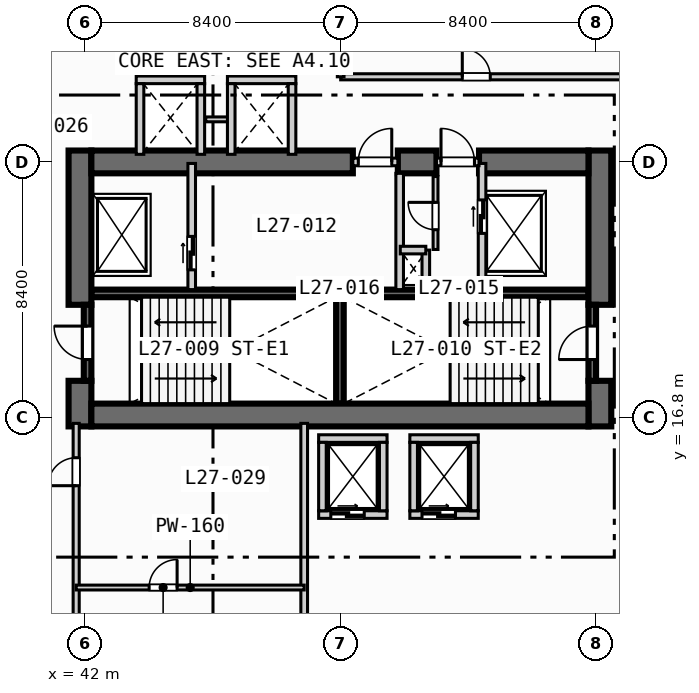
"""IFC4 building model, lengths in metres.
Left out: names, types, materials, properties, quantities, classifications, styles, units other than length and angle.
Written with IfcOpenShell. Run it as: python <this file> out.ifc"""

import sys

from ifc_helpers import new_model, si_unit, direction, frame, frame_2d, origin, place, context, subcontext, project, spatial, rectangle, extrude, element, fill, save


model = new_model("IFC4")
c1 = context("Model", 3, precision=1e-05, world=origin(), true_north=direction((0.0, 1.0)))
c2 = subcontext(c1, "Body", "Model", "MODEL_VIEW")
j1 = project(units=[si_unit("LENGTHUNIT", "METRE"), si_unit("PLANEANGLEUNIT", "RADIAN")], contexts=[c1])
p1 = place(None, origin())
s1 = spatial("IfcSite", under=j1, at=p1, CompositionType="ELEMENT")
p2 = place(p1, origin())
s2 = spatial("IfcBuilding", under=s1, at=p2, CompositionType="ELEMENT")
p3 = place(p2, frame((0.0, 0.0, 115.2)))
s3 = spatial("IfcBuildingStorey", under=s2, at=p3, CompositionType="ELEMENT", Elevation=115.2)
for number, where, z_axis, x_axis in (
    (1, (42.2, 20.875, 0.0), (0.0, 0.0, 1.0), (1.0, 0.0, 0.0)),
    (2, (50.5, 20.875, 0.0), (0.0, 0.0, 1.0), (1.0, 0.0, 0.0)),
):
    element("IfcWall", number, at=place(p3, frame(where, z_axis=z_axis, x_axis=x_axis)), inside=s3, PredefinedType="SOLIDWALL", context=c2, shape_type="SweptSolid", body=[
        extrude(rectangle(XDim=8.05, YDim=0.25, at=frame_2d((4.025, 0.0))), origin(), (0.0, 0.0, 1.0), 3.55),
    ])
p4 = place(p3, frame((50.375, 17.25, 0.0), z_axis=(0.0, 0.0, 1.0), x_axis=(0.0, 1.0, 0.0)))
e3 = element("IfcWall", 3, at=p4, inside=s3, PredefinedType="SOLIDWALL", context=c2, shape_type="SweptSolid", body=[
    extrude(rectangle(XDim=3.5, YDim=0.25, at=frame_2d((1.75, 0.0))), origin(), (0.0, 0.0, 1.0), 3.55),
])
p5 = place(p3, frame((41.825, 16.5, 0.0), z_axis=(0.0, 0.0, 1.0), x_axis=(0.0, 1.0, 0.0)))
e4 = element("IfcWall", 4, at=p5, inside=s3, PredefinedType="SHEAR", context=c2, shape_type="SweptSolid", body=[
    extrude(rectangle(XDim=1.5, YDim=0.75, at=frame_2d((0.75, 0.0))), origin(), (0.0, 0.0, 1.0), 3.55),
])
p6 = place(p3, frame((41.825, 20.5, 0.0), z_axis=(0.0, 0.0, 1.0), x_axis=(0.0, 1.0, 0.0)))
e5 = element("IfcWall", 5, at=p6, inside=s3, PredefinedType="SHEAR", context=c2, shape_type="SweptSolid", body=[
    extrude(rectangle(XDim=5.075, YDim=0.75, at=frame_2d((2.538, 0.0))), origin(), (0.0, 0.0, 1.0), 3.55),
])
p7 = place(p3, frame((58.925, 16.5, 0.0), z_axis=(0.0, 0.0, 1.0), x_axis=(0.0, 1.0, 0.0)))
e6 = element("IfcWall", 6, at=p7, inside=s3, PredefinedType="SHEAR", context=c2, shape_type="SweptSolid", body=[
    extrude(rectangle(XDim=1.5, YDim=0.75, at=frame_2d((0.75, 0.0))), origin(), (0.0, 0.0, 1.0), 3.55),
])
p8 = place(p3, frame((58.925, 20.5, 0.0), z_axis=(0.0, 0.0, 1.0), x_axis=(0.0, 1.0, 0.0)))
e7 = element("IfcWall", 7, at=p8, inside=s3, PredefinedType="SHEAR", context=c2, shape_type="SweptSolid", body=[
    extrude(rectangle(XDim=5.075, YDim=0.75, at=frame_2d((2.538, 0.0))), origin(), (0.0, 0.0, 1.0), 3.55),
])
p9 = place(p3, frame((42.2, 16.875, 0.0), z_axis=(0.0, 0.0, 1.0), x_axis=(1.0, 0.0, 0.0)))
e8 = element("IfcWall", 8, at=p9, inside=s3, PredefinedType="SHEAR", context=c2, shape_type="SweptSolid", body=[
    extrude(rectangle(XDim=16.35, YDim=0.75, at=frame_2d((8.175, 0.0))), origin(), (0.0, 0.0, 1.0), 3.55),
])
p10 = place(p3, frame((42.2, 25.2, 0.0), z_axis=(0.0, 0.0, 1.0), x_axis=(1.0, 0.0, 0.0)))
e9 = element("IfcWall", 9, at=p10, inside=s3, PredefinedType="SHEAR", context=c2, shape_type="SweptSolid", body=[
    extrude(rectangle(XDim=8.6, YDim=0.75, at=frame_2d((4.3, 0.0))), origin(), (0.0, 0.0, 1.0), 3.55),
])
p11 = place(p3, frame((52.28, 25.2, 0.0), z_axis=(0.0, 0.0, 1.0), x_axis=(1.0, 0.0, 0.0)))
e10 = element("IfcWall", 10, at=p11, inside=s3, PredefinedType="SHEAR", context=c2, shape_type="SweptSolid", body=[
    extrude(rectangle(XDim=1.27, YDim=0.75, at=frame_2d((0.635, 0.0))), origin(), (0.0, 0.0, 1.0), 3.55),
])
p12 = place(p3, frame((54.95, 25.2, 0.0), z_axis=(0.0, 0.0, 1.0), x_axis=(1.0, 0.0, 0.0)))
e11 = element("IfcWall", 11, at=p12, inside=s3, PredefinedType="SHEAR", context=c2, shape_type="SweptSolid", body=[
    extrude(rectangle(XDim=3.6, YDim=0.75, at=frame_2d((1.8, 0.0))), origin(), (0.0, 0.0, 1.0), 3.55),
])
p13 = place(p3, frame((42.075, 18.0, 0.0), z_axis=(0.0, 0.0, 1.0), x_axis=(0.0, 1.0, 0.0)))
e12 = element("IfcWall", 12, at=p13, inside=s3, PredefinedType="SOLIDWALL", context=c2, shape_type="SweptSolid", body=[
    extrude(rectangle(XDim=2.5, YDim=0.25, at=frame_2d((1.25, 0.0))), origin(), (0.0, 0.0, 1.0), 3.55),
])
p14 = place(p13, frame((0.7, 0.0, 0.0)))
e13 = element("IfcOpeningElement", 13, at=p14, cuts=e12, PredefinedType="OPENING", context=c2, shape_type="SweptSolid", body=[
    extrude(rectangle(XDim=1.1, YDim=2.15, at=frame_2d((0.55, 1.075))), frame((0.0, 0.135, 0.0), z_axis=(0.0, -1.0, 0.0), x_axis=(1.0, 0.0, 0.0)), (0.0, 0.0, 1.0), 0.27),
])
p15 = place(p3, frame((58.675, 18.0, 0.0), z_axis=(0.0, 0.0, 1.0), x_axis=(0.0, 1.0, 0.0)))
e14 = element("IfcWall", 14, at=p15, inside=s3, PredefinedType="SOLIDWALL", context=c2, shape_type="SweptSolid", body=[
    extrude(rectangle(XDim=2.5, YDim=0.25, at=frame_2d((1.25, 0.0))), origin(), (0.0, 0.0, 1.0), 3.55),
])
p16 = place(p15, frame((0.7, 0.0, 0.0)))
e15 = element("IfcOpeningElement", 15, at=p16, cuts=e14, PredefinedType="OPENING", context=c2, shape_type="SweptSolid", body=[
    extrude(rectangle(XDim=1.1, YDim=2.15, at=frame_2d((0.55, 1.075))), frame((0.0, 0.135, 0.0), z_axis=(0.0, -1.0, 0.0), x_axis=(1.0, 0.0, 0.0)), (0.0, 0.0, 1.0), 0.27),
])
p17 = place(p3, frame((45.5, 21.0, 0.0), z_axis=(0.0, 0.0, 1.0), x_axis=(0.0, 1.0, 0.0)))
e16 = element("IfcWall", 16, at=p17, inside=s3, PredefinedType="SOLIDWALL", context=c2, shape_type="SweptSolid", body=[
    extrude(rectangle(XDim=4.15, YDim=0.25, at=frame_2d((2.075, 0.0))), origin(), (0.0, 0.0, 1.0), 3.55),
])
p18 = place(p17, frame((0.65, 0.0, 0.0)))
e17 = element("IfcOpeningElement", 17, at=p18, cuts=e16, PredefinedType="OPENING", context=c2, shape_type="SweptSolid", body=[
    extrude(rectangle(XDim=1.1, YDim=2.15, at=frame_2d((0.55, 1.075))), frame((0.0, 0.135, 0.0), z_axis=(0.0, -1.0, 0.0), x_axis=(1.0, 0.0, 0.0)), (0.0, 0.0, 1.0), 0.27),
])
p19 = place(p3, frame((50.8, 25.2, 0.0), z_axis=(0.0, 0.0, 1.0), x_axis=(1.0, 0.0, 0.0)))
e18 = element("IfcWall", 18, at=p19, inside=s3, PredefinedType="SOLIDWALL", context=c2, shape_type="SweptSolid", body=[
    extrude(rectangle(XDim=1.48, YDim=0.25, at=frame_2d((0.74, 0.0))), origin(), (0.0, 0.0, 1.0), 3.55),
])
p20 = place(p19, frame((0.18, 0.0, 0.0)))
e19 = element("IfcOpeningElement", 19, at=p20, cuts=e18, PredefinedType="OPENING", context=c2, shape_type="SweptSolid", body=[
    extrude(rectangle(XDim=1.1, YDim=2.15, at=frame_2d((0.55, 1.075))), frame((0.0, 0.135, 0.0), z_axis=(0.0, -1.0, 0.0), x_axis=(1.0, 0.0, 0.0)), (0.0, 0.0, 1.0), 0.27),
])
p21 = place(p3, frame((52.34, 21.0, 0.0), z_axis=(0.0, 0.0, 1.0), x_axis=(0.0, 1.0, 0.0)))
e20 = element("IfcWall", 20, at=p21, inside=s3, PredefinedType="SOLIDWALL", context=c2, shape_type="SweptSolid", body=[
    extrude(rectangle(XDim=3.825, YDim=0.25, at=frame_2d((1.913, 0.0))), origin(), (0.0, 0.0, 1.0), 3.55),
])
p22 = place(p3, frame((55.05, 21.0, 0.0), z_axis=(0.0, 0.0, 1.0), x_axis=(0.0, 1.0, 0.0)))
e21 = element("IfcWall", 21, at=p22, inside=s3, PredefinedType="SOLIDWALL", context=c2, shape_type="SweptSolid", body=[
    extrude(rectangle(XDim=4.15, YDim=0.25, at=frame_2d((2.075, 0.0))), origin(), (0.0, 0.0, 1.0), 3.55),
])
p23 = place(p22, frame((1.85, 0.0, 0.0)))
e22 = element("IfcOpeningElement", 22, at=p23, cuts=e21, PredefinedType="OPENING", context=c2, shape_type="SweptSolid", body=[
    extrude(rectangle(XDim=1.1, YDim=2.15, at=frame_2d((0.55, 1.075))), frame((0.0, 0.135, 0.0), z_axis=(0.0, -1.0, 0.0), x_axis=(1.0, 0.0, 0.0)), (0.0, 0.0, 1.0), 0.27),
])
p24 = place(p3, frame((53.55, 25.2, 0.0), z_axis=(0.0, 0.0, 1.0), x_axis=(1.0, 0.0, 0.0)))
e23 = element("IfcWall", 23, at=p24, inside=s3, PredefinedType="SOLIDWALL", context=c2, shape_type="SweptSolid", body=[
    extrude(rectangle(XDim=1.4, YDim=0.25, at=frame_2d((0.7, 0.0))), origin(), (0.0, 0.0, 1.0), 3.55),
])
p25 = place(p24, frame((0.15, 0.0, 0.0)))
e24 = element("IfcOpeningElement", 24, at=p25, cuts=e23, PredefinedType="OPENING", context=c2, shape_type="SweptSolid", body=[
    extrude(rectangle(XDim=1.1, YDim=2.15, at=frame_2d((0.55, 1.075))), frame((0.0, 0.135, 0.0), z_axis=(0.0, -1.0, 0.0), x_axis=(1.0, 0.0, 0.0)), (0.0, 0.0, 1.0), 0.27),
])
p26 = place(p3, frame((53.2, 21.0, 0.0), z_axis=(0.0, 0.0, 1.0), x_axis=(0.0, 1.0, 0.0)))
e25 = element("IfcWall", 25, at=p26, inside=s3, PredefinedType="SOLIDWALL", context=c2, shape_type="SweptSolid", body=[
    extrude(rectangle(XDim=1.3, YDim=0.25, at=frame_2d((0.65, 0.0))), origin(), (0.0, 0.0, 1.0), 3.55),
])
p27 = place(p3, frame((52.36, 22.3, 0.0), z_axis=(0.0, 0.0, 1.0), x_axis=(1.0, 0.0, 0.0)))
e26 = element("IfcWall", 26, at=p27, inside=s3, PredefinedType="SOLIDWALL", context=c2, shape_type="SweptSolid", body=[
    extrude(rectangle(XDim=0.84, YDim=0.25, at=frame_2d((0.42, 0.0))), origin(), (0.0, 0.0, 1.0), 3.55),
])
p28 = place(p3, frame((53.52, 22.32, 0.0), z_axis=(0.0, 0.0, 1.0), x_axis=(0.0, 1.0, 0.0)))
e27 = element("IfcWall", 27, at=p28, inside=s3, PredefinedType="PARTITIONING", context=c2, shape_type="SweptSolid", body=[
    extrude(rectangle(XDim=2.4, YDim=0.16, at=frame_2d((1.2, 0.0))), origin(), (0.0, 0.0, 1.0), 3.55),
])
p29 = place(p28, frame((0.65, 0.0, 0.0)))
e28 = element("IfcOpeningElement", 28, at=p29, cuts=e27, PredefinedType="OPENING", context=c2, shape_type="SweptSolid", body=[
    extrude(rectangle(XDim=0.9, YDim=2.1, at=frame_2d((0.45, 1.05))), frame((0.0, 0.09, 0.0), z_axis=(0.0, -1.0, 0.0), x_axis=(1.0, 0.0, 0.0)), (0.0, 0.0, 1.0), 0.18),
])
p30 = place(p3, frame((49.675, 13.6, 0.0), z_axis=(0.0, 0.0, 1.0), x_axis=(1.0, 0.0, 0.0)))
e29 = element("IfcWall", 29, at=p30, inside=s3, PredefinedType="SOLIDWALL", context=c2, shape_type="SweptSolid", body=[
    extrude(rectangle(XDim=2.25, YDim=0.25, at=frame_2d((1.125, 0.0))), origin(), (0.0, 0.0, 1.0), 3.55),
])
p31 = place(p30, frame((0.4, 0.0, 0.0)))
e30 = element("IfcOpeningElement", 30, at=p31, cuts=e29, PredefinedType="OPENING", context=c2, shape_type="SweptSolid", body=[
    extrude(rectangle(XDim=1.1, YDim=2.15, at=frame_2d((0.55, 1.075))), frame((0.0, 0.135, 0.0), z_axis=(0.0, -1.0, 0.0), x_axis=(1.0, 0.0, 0.0)), (0.0, 0.0, 1.0), 0.27),
])
for number, where, z_axis, x_axis in (
    (31, (49.675, 16.1, 0.0), (0.0, 0.0, 1.0), (1.0, 0.0, 0.0)),
    (32, (49.8, 13.725, 0.0), (0.0, 0.0, 1.0), (0.0, 1.0, 0.0)),
    (33, (51.8, 13.725, 0.0), (0.0, 0.0, 1.0), (0.0, 1.0, 0.0)),
):
    element("IfcWall", number, at=place(p3, frame(where, z_axis=z_axis, x_axis=x_axis)), inside=s3, PredefinedType="SOLIDWALL", context=c2, shape_type="SweptSolid", body=[
        extrude(rectangle(XDim=2.25, YDim=0.25, at=frame_2d((1.125, 0.0))), origin(), (0.0, 0.0, 1.0), 3.55),
    ])
p32 = place(p3, frame((52.675, 13.6, 0.0), z_axis=(0.0, 0.0, 1.0), x_axis=(1.0, 0.0, 0.0)))
e34 = element("IfcWall", 34, at=p32, inside=s3, PredefinedType="SOLIDWALL", context=c2, shape_type="SweptSolid", body=[
    extrude(rectangle(XDim=2.25, YDim=0.25, at=frame_2d((1.125, 0.0))), origin(), (0.0, 0.0, 1.0), 3.55),
])
p33 = place(p32, frame((0.4, 0.0, 0.0)))
e35 = element("IfcOpeningElement", 35, at=p33, cuts=e34, PredefinedType="OPENING", context=c2, shape_type="SweptSolid", body=[
    extrude(rectangle(XDim=1.1, YDim=2.15, at=frame_2d((0.55, 1.075))), frame((0.0, 0.135, 0.0), z_axis=(0.0, -1.0, 0.0), x_axis=(1.0, 0.0, 0.0)), (0.0, 0.0, 1.0), 0.27),
])
for number, where, z_axis, x_axis in (
    (36, (52.675, 16.1, 0.0), (0.0, 0.0, 1.0), (1.0, 0.0, 0.0)),
    (37, (52.8, 13.725, 0.0), (0.0, 0.0, 1.0), (0.0, 1.0, 0.0)),
    (38, (54.8, 13.725, 0.0), (0.0, 0.0, 1.0), (0.0, 1.0, 0.0)),
    (39, (43.675, 27.9, 0.0), (0.0, 0.0, 1.0), (1.0, 0.0, 0.0)),
):
    element("IfcWall", number, at=place(p3, frame(where, z_axis=z_axis, x_axis=x_axis)), inside=s3, PredefinedType="SOLIDWALL", context=c2, shape_type="SweptSolid", body=[
        extrude(rectangle(XDim=2.25, YDim=0.25, at=frame_2d((1.125, 0.0))), origin(), (0.0, 0.0, 1.0), 3.55),
    ])
for number, where, z_axis, x_axis in (
    (40, (43.8, 25.45, 0.0), (0.0, 0.0, 1.0), (0.0, 1.0, 0.0)),
    (41, (45.8, 25.45, 0.0), (0.0, 0.0, 1.0), (0.0, 1.0, 0.0)),
):
    element("IfcWall", number, at=place(p3, frame(where, z_axis=z_axis, x_axis=x_axis)), inside=s3, PredefinedType="SOLIDWALL", context=c2, shape_type="SweptSolid", body=[
        extrude(rectangle(XDim=2.325, YDim=0.25, at=frame_2d((1.163, 0.0))), origin(), (0.0, 0.0, 1.0), 3.55),
    ])
p34 = place(p3, frame((45.96, 26.6, 0.0), z_axis=(0.0, 0.0, 1.0), x_axis=(1.0, 0.0, 0.0)))
e42 = element("IfcWall", 42, at=p34, inside=s3, PredefinedType="PARTITIONING", context=c2, shape_type="SweptSolid", body=[
    extrude(rectangle(XDim=0.88, YDim=0.16, at=frame_2d((0.44, 0.0))), origin(), (0.0, 0.0, 1.0), 3.55),
])
p35 = place(p3, frame((46.675, 27.9, 0.0), z_axis=(0.0, 0.0, 1.0), x_axis=(1.0, 0.0, 0.0)))
e43 = element("IfcWall", 43, at=p35, inside=s3, PredefinedType="SOLIDWALL", context=c2, shape_type="SweptSolid", body=[
    extrude(rectangle(XDim=2.25, YDim=0.25, at=frame_2d((1.125, 0.0))), origin(), (0.0, 0.0, 1.0), 3.55),
])
for number, where, z_axis, x_axis in (
    (44, (46.8, 25.45, 0.0), (0.0, 0.0, 1.0), (0.0, 1.0, 0.0)),
    (45, (48.8, 25.45, 0.0), (0.0, 0.0, 1.0), (0.0, 1.0, 0.0)),
):
    element("IfcWall", number, at=place(p3, frame(where, z_axis=z_axis, x_axis=x_axis)), inside=s3, PredefinedType="SOLIDWALL", context=c2, shape_type="SweptSolid", body=[
        extrude(rectangle(XDim=2.325, YDim=0.25, at=frame_2d((1.163, 0.0))), origin(), (0.0, 0.0, 1.0), 3.55),
    ])
p36 = place(p3, frame((41.7, 0.35, 0.0), z_axis=(0.0, 0.0, 1.0), x_axis=(0.0, 1.0, 0.0)))
e46 = element("IfcWall", 46, at=p36, inside=s3, PredefinedType="PARTITIONING", context=c2, shape_type="SweptSolid", body=[
    extrude(rectangle(XDim=16.25, YDim=0.2, at=frame_2d((8.125, 0.0))), origin(), (0.0, 0.0, 1.0), 2.8),
])
p37 = place(p36, frame((14.2, 0.0, 0.0)))
e47 = element("IfcOpeningElement", 47, at=p37, cuts=e46, PredefinedType="OPENING", context=c2, shape_type="SweptSolid", body=[
    extrude(rectangle(XDim=0.92, YDim=2.1, at=frame_2d((0.46, 1.05))), frame((0.0, 0.11, 0.0), z_axis=(0.0, -1.0, 0.0), x_axis=(1.0, 0.0, 0.0)), (0.0, 0.0, 1.0), 0.22),
])
p38 = place(p3, frame((49.2, 0.35, 0.0), z_axis=(0.0, 0.0, 1.0), x_axis=(0.0, 1.0, 0.0)))
e48 = element("IfcWall", 48, at=p38, inside=s3, PredefinedType="PARTITIONING", context=c2, shape_type="SweptSolid", body=[
    extrude(rectangle(XDim=16.25, YDim=0.22, at=frame_2d((8.125, 0.0))), origin(), (0.0, 0.0, 1.0), 3.55),
])
p39 = place(p3, frame((41.7, 11.2, 0.0), z_axis=(0.0, 0.0, 1.0), x_axis=(1.0, 0.0, 0.0)))
e49 = element("IfcWall", 49, at=p39, inside=s3, PredefinedType="PARTITIONING", context=c2, shape_type="SweptSolid", body=[
    extrude(rectangle(XDim=7.5, YDim=0.16, at=frame_2d((3.75, 0.0))), origin(), (0.0, 0.0, 1.0), 3.55),
])
p40 = place(p39, frame((2.4, 0.0, 0.0)))
e50 = element("IfcOpeningElement", 50, at=p40, cuts=e49, PredefinedType="OPENING", context=c2, shape_type="SweptSolid", body=[
    extrude(rectangle(XDim=0.92, YDim=2.1, at=frame_2d((0.46, 1.05))), frame((0.0, 0.09, 0.0), z_axis=(0.0, -1.0, 0.0), x_axis=(1.0, 0.0, 0.0)), (0.0, 0.0, 1.0), 0.18),
])
p41 = place(p3, frame((50.4, 28.0, 0.0), z_axis=(0.0, 0.0, 1.0), x_axis=(1.0, 0.0, 0.0)))
e51 = element("IfcWall", 51, at=p41, inside=s3, PredefinedType="PARTITIONING", context=c2, shape_type="SweptSolid", body=[
    extrude(rectangle(XDim=21.8, YDim=0.2, at=frame_2d((10.9, 0.0))), origin(), (0.0, 0.0, 1.0), 3.55),
])
p42 = place(p41, frame((4.0, 0.0, 0.0)))
e52 = element("IfcOpeningElement", 52, at=p42, cuts=e51, PredefinedType="OPENING", context=c2, shape_type="SweptSolid", body=[
    extrude(rectangle(XDim=0.92, YDim=2.1, at=frame_2d((0.46, 1.05))), frame((0.0, 0.11, 0.0), z_axis=(0.0, -1.0, 0.0), x_axis=(1.0, 0.0, 0.0)), (0.0, 0.0, 1.0), 0.22),
])
p43 = place(p3, frame((50.4, 28.0, 0.0), z_axis=(0.0, 0.0, 1.0), x_axis=(0.0, 1.0, 0.0)))
e53 = element("IfcWall", 53, at=p43, inside=s3, PredefinedType="PARTITIONING", context=c2, shape_type="SweptSolid", body=[
    extrude(rectangle(XDim=5.3, YDim=0.22, at=frame_2d((2.65, 0.0))), origin(), (0.0, 0.0, 1.0), 3.007),
])
p44 = place(p14, origin())
e54 = element("IfcDoor", 54, at=p44, inside=s3, OperationType="SINGLE_SWING_RIGHT", PredefinedType="DOOR", context=c2, shape_type="SweptSolid", body=[
    extrude(rectangle(XDim=1.1, YDim=2.15, at=frame_2d((0.55, 1.075))), frame((0.0, 0.025, 0.0), z_axis=(0.0, -1.0, 0.0), x_axis=(1.0, 0.0, 0.0)), (0.0, 0.0, 1.0), 0.05),
])
fill(e13, e54)
p45 = place(p16, origin())
e55 = element("IfcDoor", 55, at=p45, inside=s3, OperationType="SINGLE_SWING_LEFT", PredefinedType="DOOR", context=c2, shape_type="SweptSolid", body=[
    extrude(rectangle(XDim=1.1, YDim=2.15, at=frame_2d((0.55, 1.075))), frame((0.0, 0.025, 0.0), z_axis=(0.0, -1.0, 0.0), x_axis=(1.0, 0.0, 0.0)), (0.0, 0.0, 1.0), 0.05),
])
fill(e15, e55)
p46 = place(p18, origin())
e56 = element("IfcDoor", 56, at=p46, inside=s3, OperationType="SLIDING_TO_LEFT", PredefinedType="DOOR", context=c2, shape_type="SweptSolid", body=[
    extrude(rectangle(XDim=1.1, YDim=2.15, at=frame_2d((0.55, 1.075))), frame((0.0, 0.025, 0.0), z_axis=(0.0, -1.0, 0.0), x_axis=(1.0, 0.0, 0.0)), (0.0, 0.0, 1.0), 0.05),
])
fill(e17, e56)
p47 = place(p20, origin())
e57 = element("IfcDoor", 57, at=p47, inside=s3, OperationType="SINGLE_SWING_RIGHT", PredefinedType="DOOR", context=c2, shape_type="SweptSolid", body=[
    extrude(rectangle(XDim=1.1, YDim=2.15, at=frame_2d((0.55, 1.075))), frame((0.0, 0.025, 0.0), z_axis=(0.0, -1.0, 0.0), x_axis=(1.0, 0.0, 0.0)), (0.0, 0.0, 1.0), 0.05),
])
fill(e19, e57)
p48 = place(p23, origin())
e58 = element("IfcDoor", 58, at=p48, inside=s3, OperationType="SLIDING_TO_LEFT", PredefinedType="DOOR", context=c2, shape_type="SweptSolid", body=[
    extrude(rectangle(XDim=1.1, YDim=2.15, at=frame_2d((0.55, 1.075))), frame((0.0, 0.025, 0.0), z_axis=(0.0, -1.0, 0.0), x_axis=(1.0, 0.0, 0.0)), (0.0, 0.0, 1.0), 0.05),
])
fill(e22, e58)
p49 = place(p25, origin())
e59 = element("IfcDoor", 59, at=p49, inside=s3, OperationType="SINGLE_SWING_LEFT", PredefinedType="DOOR", context=c2, shape_type="SweptSolid", body=[
    extrude(rectangle(XDim=1.1, YDim=2.15, at=frame_2d((0.55, 1.075))), frame((0.0, 0.025, 0.0), z_axis=(0.0, -1.0, 0.0), x_axis=(1.0, 0.0, 0.0)), (0.0, 0.0, 1.0), 0.05),
])
fill(e24, e59)
p50 = place(p29, origin())
e60 = element("IfcDoor", 60, at=p50, inside=s3, OperationType="SINGLE_SWING_RIGHT", PredefinedType="DOOR", context=c2, shape_type="SweptSolid", body=[
    extrude(rectangle(XDim=0.9, YDim=2.1, at=frame_2d((0.45, 1.05))), frame((0.0, 0.025, 0.0), z_axis=(0.0, -1.0, 0.0), x_axis=(1.0, 0.0, 0.0)), (0.0, 0.0, 1.0), 0.05),
])
fill(e28, e60)
p51 = place(p31, origin())
e61 = element("IfcDoor", 61, at=p51, inside=s3, OperationType="SLIDING_TO_LEFT", PredefinedType="DOOR", context=c2, shape_type="SweptSolid", body=[
    extrude(rectangle(XDim=1.1, YDim=2.15, at=frame_2d((0.55, 1.075))), frame((0.0, 0.025, 0.0), z_axis=(0.0, -1.0, 0.0), x_axis=(1.0, 0.0, 0.0)), (0.0, 0.0, 1.0), 0.05),
])
fill(e30, e61)
p52 = place(p33, origin())
e62 = element("IfcDoor", 62, at=p52, inside=s3, OperationType="SLIDING_TO_LEFT", PredefinedType="DOOR", context=c2, shape_type="SweptSolid", body=[
    extrude(rectangle(XDim=1.1, YDim=2.15, at=frame_2d((0.55, 1.075))), frame((0.0, 0.025, 0.0), z_axis=(0.0, -1.0, 0.0), x_axis=(1.0, 0.0, 0.0)), (0.0, 0.0, 1.0), 0.05),
])
fill(e35, e62)
p53 = place(p37, origin())
e63 = element("IfcDoor", 63, at=p53, inside=s3, OperationType="SINGLE_SWING_LEFT", PredefinedType="DOOR", context=c2, shape_type="SweptSolid", body=[
    extrude(rectangle(XDim=0.92, YDim=2.1, at=frame_2d((0.46, 1.05))), frame((0.0, 0.025, 0.0), z_axis=(0.0, -1.0, 0.0), x_axis=(1.0, 0.0, 0.0)), (0.0, 0.0, 1.0), 0.05),
])
fill(e47, e63)
p54 = place(p40, origin())
e64 = element("IfcDoor", 64, at=p54, inside=s3, OperationType="SINGLE_SWING_RIGHT", PredefinedType="DOOR", context=c2, shape_type="SweptSolid", body=[
    extrude(rectangle(XDim=0.92, YDim=2.1, at=frame_2d((0.46, 1.05))), frame((0.0, 0.025, 0.0), z_axis=(0.0, -1.0, 0.0), x_axis=(1.0, 0.0, 0.0)), (0.0, 0.0, 1.0), 0.05),
])
fill(e50, e64)
p55 = place(p42, origin())
e65 = element("IfcDoor", 65, at=p55, inside=s3, OperationType="SINGLE_SWING_LEFT", PredefinedType="DOOR", context=c2, shape_type="SweptSolid", body=[
    extrude(rectangle(XDim=0.92, YDim=2.1, at=frame_2d((0.46, 1.05))), frame((0.0, 0.025, 0.0), z_axis=(0.0, -1.0, 0.0), x_axis=(1.0, 0.0, 0.0)), (0.0, 0.0, 1.0), 0.05),
])
fill(e52, e65)
save(model, sys.argv[1])
